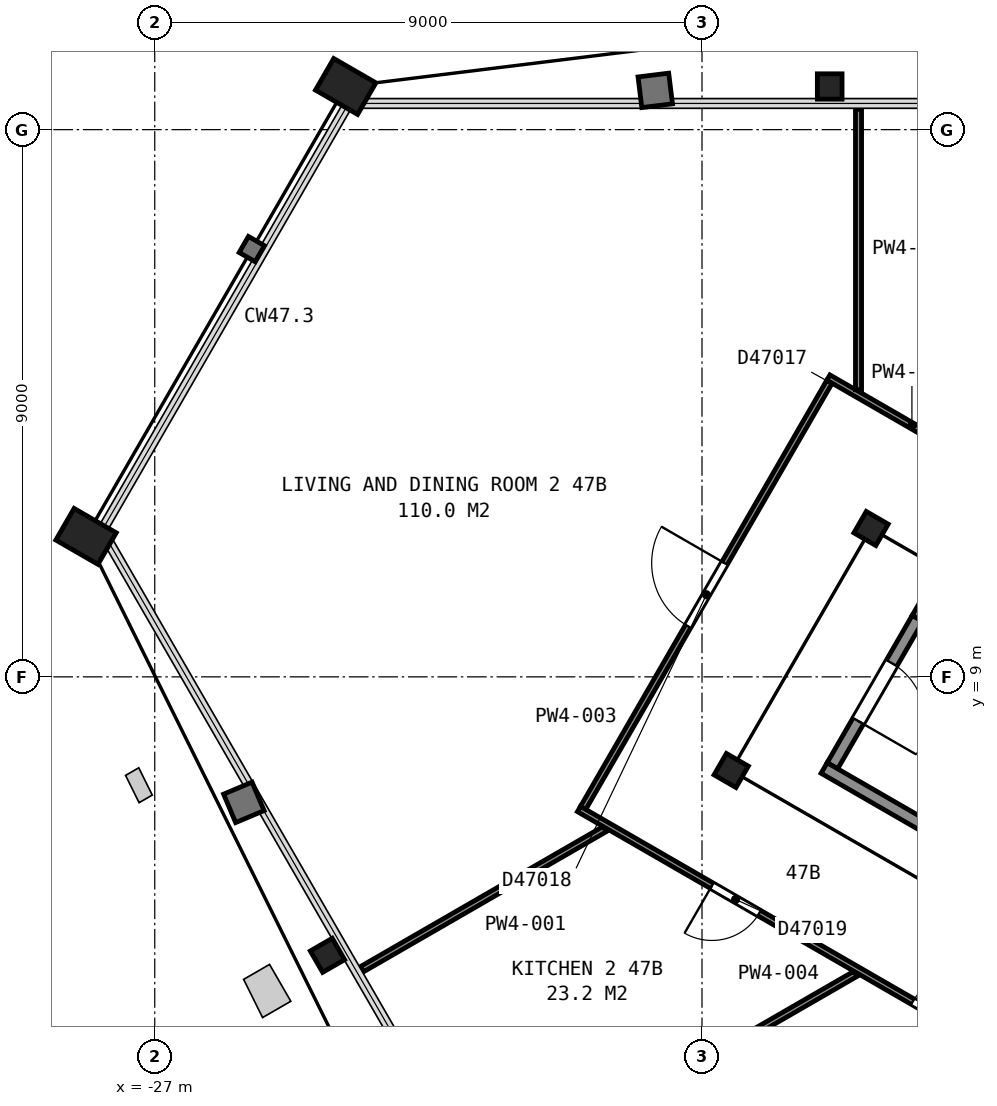
"""IFC4 building model, lengths in metres.
Left out: names, types, materials, properties, quantities, classifications, styles, units other than length and angle.
Written with IfcOpenShell. Run it as: python <this file> out.ifc"""

import sys

from ifc_helpers import new_model, si_unit, direction, frame, frame_2d, origin, origin_2d, place, context, subcontext, project, spatial, rectangle, hollow_rectangle, i_section, extrude, element, fill, save


model = new_model("IFC4")
c1 = context("Model", 3, precision=1e-05, world=origin(), true_north=direction((0.0, 1.0)))
c2 = subcontext(c1, "Body", "Model", "MODEL_VIEW")
j1 = project(units=[si_unit("LENGTHUNIT", "METRE"), si_unit("PLANEANGLEUNIT", "RADIAN")], contexts=[c1])
p1 = place(None, origin())
s1 = spatial("IfcSite", under=j1, at=p1, CompositionType="ELEMENT")
p2 = place(p1, origin())
s2 = spatial("IfcBuilding", under=s1, at=p2, CompositionType="ELEMENT")
p3 = place(p2, frame((0.0, 0.0, 189.5)))
s3 = spatial("IfcBuildingStorey", under=s2, at=p3, CompositionType="ELEMENT", Elevation=189.5)
p4 = place(p3, frame((-15.9, 18.71, 0.04), z_axis=(0.0, 0.0, 1.0), x_axis=(1.0, 0.0, 0.0)))
e1 = element("IfcColumn", 1, at=p4, inside=s3, PredefinedType="COLUMN", context=c2, shape_type="SweptSolid", body=[
    extrude(i_section(OverallWidth=0.406, OverallDepth=0.417, WebThickness=0.03, FlangeThickness=0.048, FilletRadius=0.015, at=origin_2d()), origin(), (0.0, 0.0, 1.0), 3.66),
])
for number, where, z_axis, x_axis in (
    (2, (-23.86, 18.71, 0.065), (0.0, 0.0, 1.0), (0.5, 0.866, 0.0)),
    (3, (-28.13, 11.31, 0.065), (0.0, 0.0, 1.0), (0.5, 0.866, 0.0)),
):
    element("IfcColumn", number, at=place(p3, frame(where, z_axis=z_axis, x_axis=x_axis)), inside=s3, PredefinedType="COLUMN", context=c2, shape_type="SweptSolid", body=[
        extrude(hollow_rectangle(XDim=0.6, YDim=0.8, WallThickness=0.05, at=origin_2d()), origin(), (0.0, 0.0, 1.0), 3.635),
    ])
p5 = place(p3, frame((-24.16, 4.42, 0.04), z_axis=(0.0, 0.0, 1.0), x_axis=(-0.5, 0.866025403784, 0.0)))
e4 = element("IfcColumn", 4, at=p5, inside=s3, PredefinedType="COLUMN", context=c2, shape_type="SweptSolid", body=[
    extrude(i_section(OverallWidth=0.406, OverallDepth=0.417, WebThickness=0.03, FlangeThickness=0.048, FilletRadius=0.015, at=origin_2d()), origin(), (0.0, 0.0, 1.0), 3.66),
])
for number, where, z_axis, x_axis in (
    (5, (-15.22, 11.44, 0.0), (0.0, 0.0, 1.0), (0.5, 0.866, 0.0)),
    (6, (-17.52, 7.46, 0.0), (0.0, 0.0, 1.0), (0.5, 0.866, 0.0)),
):
    element("IfcColumn", number, at=place(p3, frame(where, z_axis=z_axis, x_axis=x_axis)), inside=s3, PredefinedType="COLUMN", context=c2, shape_type="SweptSolid", body=[
        extrude(i_section(OverallWidth=0.406, OverallDepth=0.417, WebThickness=0.03, FlangeThickness=0.048, FilletRadius=0.015, at=origin_2d()), origin(), (0.0, 0.0, 1.0), 3.7),
    ])
p6 = place(p3, frame((-14.455, 9.962, 0.0), z_axis=(0.0, 0.0, 1.0), x_axis=(-0.500049511043, -0.865996816683, 0.0)))
e7 = element("IfcWall", 7, at=p6, inside=s3, PredefinedType="PARTITIONING", context=c2, shape_type="SweptSolid", body=[
    extrude(rectangle(XDim=2.8, YDim=0.2, at=frame_2d((1.4, 0.0))), origin(), (0.0, 0.0, 1.0), 3.45),
])
p7 = place(p6, frame((0.85, 0.0, 0.0)))
e8 = element("IfcOpeningElement", 8, at=p7, cuts=e7, PredefinedType="OPENING", context=c2, shape_type="SweptSolid", body=[
    extrude(rectangle(XDim=1.1, YDim=2.1, at=frame_2d((0.55, 1.05))), frame((0.0, 0.11, 0.0), z_axis=(0.0, -1.0, 0.0), x_axis=(1.0, 0.0, 0.0)), (0.0, 0.0, 1.0), 0.22),
])
for number, where, z_axis, x_axis in (
    (9, (-7.678, 2.701, 0.0), (0.0, 0.0, 1.0), (-0.866, 0.5, 0.0)),
    (10, (-6.178, 5.299, 0.0), (0.0, 0.0, 1.0), (-0.866, 0.5, 0.0)),
):
    element("IfcWall", number, at=place(p3, frame(where, z_axis=z_axis, x_axis=x_axis)), inside=s3, PredefinedType="PARTITIONING", context=c2, shape_type="SweptSolid", body=[
        extrude(rectangle(XDim=9.6, YDim=0.2, at=frame_2d((4.8, 0.0))), origin(), (0.0, 0.0, 1.0), 3.45),
    ])
p8 = place(p3, frame((-23.592, 4.192, 0.0), z_axis=(0.0, 0.0, 1.0), x_axis=(0.866056775574, 0.499945658529, 0.0)))
e11 = element("IfcWall", 11, at=p8, inside=s3, PredefinedType="PARTITIONING", context=c2, shape_type="SweptSolid", body=[
    extrude(rectangle(XDim=4.608, YDim=0.1, at=frame_2d((2.304, 0.0))), origin(), (0.0, 0.0, 1.0), 2.713),
])
p9 = place(p3, frame((-21.53, 0.62, 0.0), z_axis=(0.0, 0.0, 1.0), x_axis=(0.865986079307, 0.500068105808, 0.0)))
e12 = element("IfcWall", 12, at=p9, inside=s3, PredefinedType="PARTITIONING", context=c2, shape_type="SweptSolid", body=[
    extrude(rectangle(XDim=6.99, YDim=0.1, at=frame_2d((3.495, 0.0))), origin(), (0.0, 0.0, 1.0), 2.713),
])
p10 = place(p3, frame((-19.955, 6.844, 0.0), z_axis=(0.0, 0.0, 1.0), x_axis=(0.500415732313, 0.865785247537, 0.0)))
e13 = element("IfcWall", 13, at=p10, inside=s3, PredefinedType="PARTITIONING", context=c2, shape_type="SweptSolid", body=[
    extrude(rectangle(XDim=8.097, YDim=0.1, at=frame_2d((4.049, 0.0))), origin(), (0.0, 0.0, 1.0), 2.713),
])
p11 = place(p10, frame((3.45, 0.0, 0.0)))
e14 = element("IfcOpeningElement", 14, at=p11, cuts=e13, PredefinedType="OPENING", context=c2, shape_type="SweptSolid", body=[
    extrude(rectangle(XDim=1.2, YDim=2.1, at=frame_2d((0.6, 1.05))), frame((0.0, 0.06, 0.0), z_axis=(0.0, -1.0, 0.0), x_axis=(1.0, 0.0, 0.0)), (0.0, 0.0, 1.0), 0.12),
])
p12 = place(p3, frame((-12.952, 2.744, 0.0), z_axis=(0.0, 0.0, 1.0), x_axis=(-0.86608949446, 0.499888975259, 0.0)))
e15 = element("IfcWall", 15, at=p12, inside=s3, PredefinedType="PARTITIONING", context=c2, shape_type="SweptSolid", body=[
    extrude(rectangle(XDim=8.165, YDim=0.1, at=frame_2d((4.083, 0.0))), origin(), (0.0, 0.0, 1.0), 2.713),
])
p13 = place(p12, frame((4.741, 0.0, 0.0)))
e16 = element("IfcOpeningElement", 16, at=p13, cuts=e15, PredefinedType="OPENING", context=c2, shape_type="SweptSolid", body=[
    extrude(rectangle(XDim=0.9, YDim=2.1, at=frame_2d((0.45, 1.05))), frame((0.0, 0.06, 0.0), z_axis=(0.0, -1.0, 0.0), x_axis=(1.0, 0.0, 0.0)), (0.0, 0.0, 1.0), 0.12),
])
p14 = place(p12, frame((0.928, 0.0, 0.0)))
e17 = element("IfcOpeningElement", 17, at=p14, cuts=e15, PredefinedType="OPENING", context=c2, shape_type="SweptSolid", body=[
    extrude(rectangle(XDim=0.9, YDim=2.1, at=frame_2d((0.45, 1.05))), frame((0.0, 0.06, 0.0), z_axis=(0.0, -1.0, 0.0), x_axis=(1.0, 0.0, 0.0)), (0.0, 0.0, 1.0), 0.12),
])
p15 = place(p3, frame((-15.921, 13.923, 0.0), z_axis=(0.0, 0.0, 1.0), x_axis=(0.866088973199, -0.499889878377, 0.0)))
e18 = element("IfcWall", 18, at=p15, inside=s3, PredefinedType="PARTITIONING", context=c2, shape_type="SweptSolid", body=[
    extrude(rectangle(XDim=8.163, YDim=0.1, at=frame_2d((4.082, 0.0))), origin(), (0.0, 0.0, 1.0), 2.713),
])
p16 = place(p15, frame((6.99, 0.0, 0.0)))
e19 = element("IfcOpeningElement", 19, at=p16, cuts=e18, PredefinedType="OPENING", context=c2, shape_type="SweptSolid", body=[
    extrude(rectangle(XDim=0.9, YDim=2.1, at=frame_2d((0.45, 1.05))), frame((0.0, 0.06, 0.0), z_axis=(0.0, -1.0, 0.0), x_axis=(1.0, 0.0, 0.0)), (0.0, 0.0, 1.0), 0.12),
])
p17 = place(p15, frame((3.172, 0.0, 0.0)))
e20 = element("IfcOpeningElement", 20, at=p17, cuts=e18, PredefinedType="OPENING", context=c2, shape_type="SweptSolid", body=[
    extrude(rectangle(XDim=0.9, YDim=2.1, at=frame_2d((0.45, 1.05))), frame((0.0, 0.06, 0.0), z_axis=(0.0, -1.0, 0.0), x_axis=(1.0, 0.0, 0.0)), (0.0, 0.0, 1.0), 0.12),
])
p18 = place(p3, frame((-15.426, 13.724, 0.0), z_axis=(0.0, 0.0, 1.0), x_axis=(0.0, 1.0, 0.0)))
e21 = element("IfcWall", 21, at=p18, inside=s3, PredefinedType="PARTITIONING", context=c2, shape_type="SweptSolid", body=[
    extrude(rectangle(XDim=4.611, YDim=0.1, at=frame_2d((2.306, 0.0))), origin(), (0.0, 0.0, 1.0), 2.713),
])
p19 = place(p7, origin())
e22 = element("IfcDoor", 22, at=p19, inside=s3, OperationType="SINGLE_SWING_RIGHT", PredefinedType="DOOR", context=c2, shape_type="SweptSolid", body=[
    extrude(rectangle(XDim=1.1, YDim=2.1, at=frame_2d((0.55, 1.05))), frame((0.0, 0.025, 0.0), z_axis=(0.0, -1.0, 0.0), x_axis=(1.0, 0.0, 0.0)), (0.0, 0.0, 1.0), 0.05),
])
fill(e8, e22)
p20 = place(p11, origin())
e23 = element("IfcDoor", 23, at=p20, inside=s3, OperationType="SINGLE_SWING_RIGHT", PredefinedType="DOOR", context=c2, shape_type="SweptSolid", body=[
    extrude(rectangle(XDim=1.2, YDim=2.1, at=frame_2d((0.6, 1.05))), frame((0.0, 0.025, 0.0), z_axis=(0.0, -1.0, 0.0), x_axis=(1.0, 0.0, 0.0)), (0.0, 0.0, 1.0), 0.05),
])
fill(e14, e23)
p21 = place(p13, origin())
e24 = element("IfcDoor", 24, at=p21, inside=s3, OperationType="SINGLE_SWING_RIGHT", PredefinedType="DOOR", context=c2, shape_type="SweptSolid", body=[
    extrude(rectangle(XDim=0.9, YDim=2.1, at=frame_2d((0.45, 1.05))), frame((0.0, 0.025, 0.0), z_axis=(0.0, -1.0, 0.0), x_axis=(1.0, 0.0, 0.0)), (0.0, 0.0, 1.0), 0.05),
])
fill(e16, e24)
p22 = place(p14, origin())
e25 = element("IfcDoor", 25, at=p22, inside=s3, OperationType="SINGLE_SWING_LEFT", PredefinedType="DOOR", context=c2, shape_type="SweptSolid", body=[
    extrude(rectangle(XDim=0.9, YDim=2.1, at=frame_2d((0.45, 1.05))), frame((0.0, 0.025, 0.0), z_axis=(0.0, -1.0, 0.0), x_axis=(1.0, 0.0, 0.0)), (0.0, 0.0, 1.0), 0.05),
])
fill(e17, e25)
save(model, sys.argv[1])
